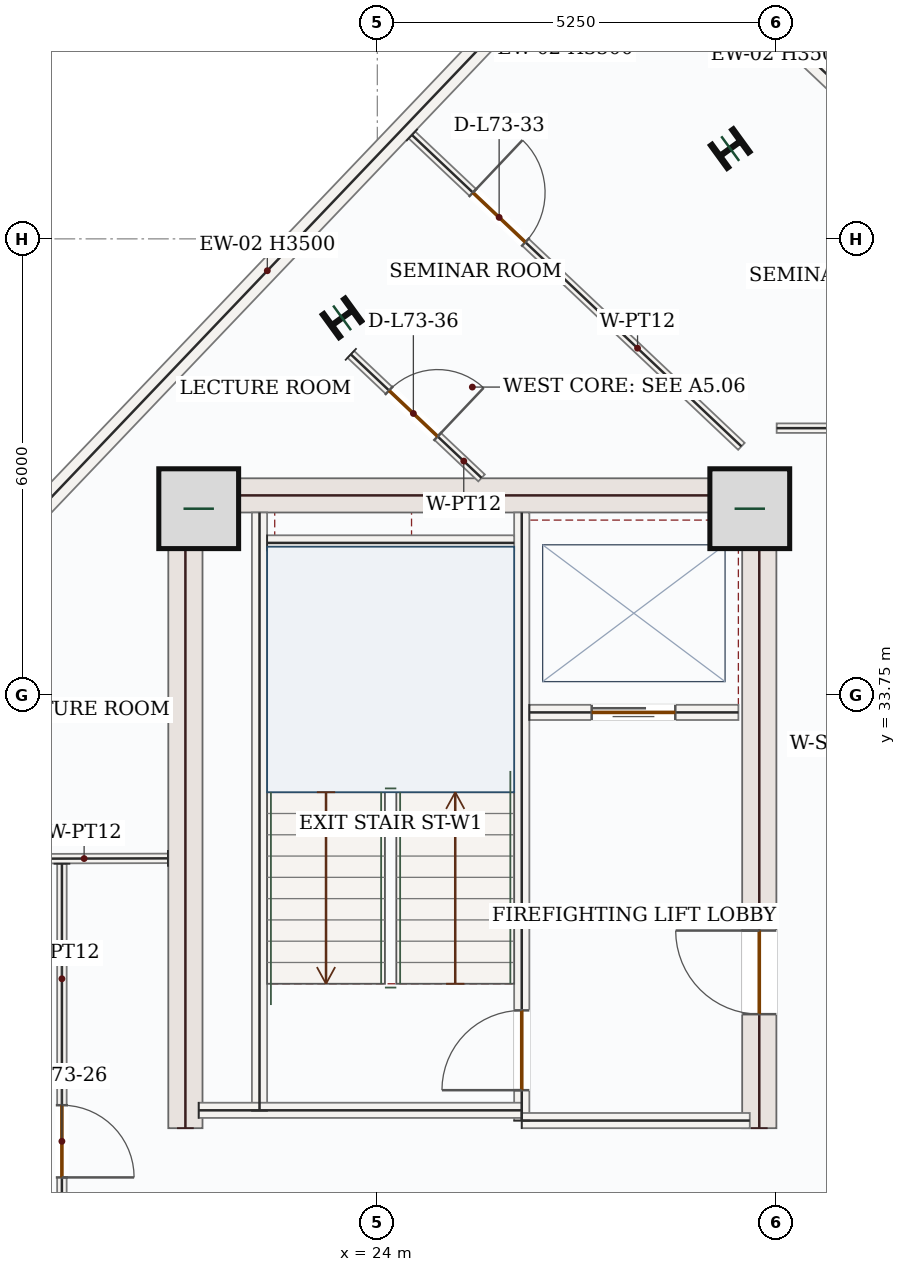
"""IFC4 building model, lengths in metres.
Left out: names, types, materials, properties, quantities, classifications, styles, units other than length and angle.
Written with IfcOpenShell. Run it as: python <this file> out.ifc"""

import sys

from ifc_helpers import new_model, si_unit, direction, frame, frame_2d, origin, origin_2d, place, context, subcontext, project, spatial, rectangle, i_section, extrude, source, transform, mapped, element, fill, save


model = new_model("IFC4")
c1 = context("Model", 3, precision=1e-05, world=origin(), true_north=direction((0.0, 1.0)))
c2 = subcontext(c1, "Body", "Model", "MODEL_VIEW")
j1 = project(units=[si_unit("LENGTHUNIT", "METRE"), si_unit("PLANEANGLEUNIT", "RADIAN")], contexts=[c1])
p1 = place(None, origin())
s1 = spatial("IfcSite", under=j1, at=p1, CompositionType="ELEMENT")
p2 = place(p1, origin())
s2 = spatial("IfcBuilding", under=s1, at=p2, CompositionType="ELEMENT")
p3 = place(p2, frame((0.0, 0.0, 302.85)))
s3 = spatial("IfcBuildingStorey", under=s2, at=p3, CompositionType="ELEMENT", Elevation=302.85)
m1 = source(origin(), c2, "Body", "SweptSolid", [
    extrude(rectangle(XDim=8.55, YDim=0.45, at=frame_2d((4.275, 0.0))), origin(), (0.0, 0.0, 1.0), 3.5),
])
p4 = place(p3, frame((21.475, 28.05, 0.0), z_axis=(0.0, 0.0, 1.0), x_axis=(0.0, 1.0, 0.0)))
e1 = element("IfcWall", 1, at=p4, inside=s3, PredefinedType="SHEAR", context=c2, shape_type="MappedRepresentation", body=[
    mapped(m1, transform((0.0, 0.0, 0.0), x_axis=(1.0, 0.0, 0.0), y_axis=(0.0, 1.0, 0.0), z_axis=(0.0, 0.0, 1.0), scale=1.0)),
])
p5 = place(p3, frame((29.025, 28.05, 0.0), z_axis=(0.0, 0.0, 1.0), x_axis=(0.0, 1.0, 0.0)))
e2 = element("IfcWall", 2, at=p5, inside=s3, PredefinedType="SHEAR", context=c2, shape_type="SweptSolid", body=[
    extrude(rectangle(XDim=8.55, YDim=0.45, at=frame_2d((4.275, 0.0))), origin(), (0.0, 0.0, 1.0), 3.5),
])
p6 = place(p5, frame((1.5, 0.0, 0.0)))
e3 = element("IfcOpeningElement", 3, at=p6, cuts=e2, PredefinedType="OPENING", context=c2, shape_type="SweptSolid", body=[
    extrude(rectangle(XDim=1.1, YDim=2.2, at=frame_2d((0.55, 1.1))), frame((0.0, 0.235, 0.0), z_axis=(0.0, -1.0, 0.0), x_axis=(1.0, 0.0, 0.0)), (0.0, 0.0, 1.0), 0.47),
])
m2 = source(origin(), c2, "Body", "SweptSolid", [
    extrude(rectangle(XDim=7.1, YDim=0.45, at=frame_2d((3.55, 0.0))), origin(), (0.0, 0.0, 1.0), 3.5),
])
p7 = place(p3, frame((21.7, 36.375, 0.0), z_axis=(0.0, 0.0, 1.0), x_axis=(1.0, 0.0, 0.0)))
e4 = element("IfcWall", 4, at=p7, inside=s3, PredefinedType="SHEAR", context=c2, shape_type="MappedRepresentation", body=[
    mapped(m2, transform((0.0, 0.0, 0.0), x_axis=(1.0, 0.0, 0.0), y_axis=(0.0, 1.0, 0.0), z_axis=(0.0, 0.0, 1.0), scale=1.0)),
])
m3 = source(origin(), c2, "Body", "SweptSolid", [
    extrude(rectangle(XDim=1.05, YDim=1.05, at=origin_2d()), origin(), (0.0, 0.0, 1.0), 3.75),
])
for number, where, z_axis, x_axis in (
    (5, (21.65, 36.2, 0.0), (0.0, 0.0, 1.0), (1.0, 0.0, 0.0)),
    (6, (28.9, 36.2, 0.0), (0.0, 0.0, 1.0), (1.0, 0.0, 0.0)),
):
    element("IfcColumn", number, at=place(p3, frame(where, z_axis=z_axis, x_axis=x_axis)), inside=s3, PredefinedType="COLUMN", context=c2, shape_type="MappedRepresentation", body=[
        mapped(m3, transform((0.0, 0.0, 0.0), x_axis=(1.0, 0.0, 0.0), y_axis=(0.0, 1.0, 0.0), z_axis=(0.0, 0.0, 1.0), scale=1.0)),
    ])
m4 = source(origin(), c2, "Body", "SweptSolid", [
    extrude(i_section(OverallWidth=0.374, OverallDepth=0.372, WebThickness=0.016, FlangeThickness=0.026, FilletRadius=0.018, at=origin_2d()), origin(), (0.0, 0.0, 1.0), 3.75),
])
for number, where, z_axis, x_axis in (
    (7, (28.643, 40.937, 0.0), (0.0, 0.0, 1.0), (-0.588, 0.809, 0.0)),
    (8, (23.536, 38.711, 0.0), (0.0, 0.0, 1.0), (-0.588, 0.809, 0.0)),
):
    element("IfcColumn", number, at=place(p3, frame(where, z_axis=z_axis, x_axis=x_axis)), inside=s3, PredefinedType="COLUMN", context=c2, shape_type="MappedRepresentation", body=[
        mapped(m4, transform((0.0, 0.0, 0.0), x_axis=(1.0, 0.0, 0.0), y_axis=(0.0, 1.0, 0.0), z_axis=(0.0, 0.0, 1.0), scale=1.0)),
    ])
m5 = source(origin(), c2, "Body", "SweptSolid", [
    extrude(rectangle(XDim=10.47, YDim=0.28, at=frame_2d((5.235, 0.0))), origin(), (0.0, 0.0, 1.0), 3.5),
])
p8 = place(p3, frame((18.94, 35.542, 0.0), z_axis=(0.0, 0.0, 1.0), x_axis=(0.690070788875, 0.723741878256, 0.0)))
e9 = element("IfcWall", 9, at=p8, inside=s3, PredefinedType="SOLIDWALL", context=c2, shape_type="MappedRepresentation", body=[
    mapped(m5, transform((0.0, 0.0, 0.0), x_axis=(1.0, 0.0, 0.0), y_axis=(0.0, 1.0, 0.0), z_axis=(0.0, 0.0, 1.0), scale=1.0)),
])
p9 = place(p3, frame((28.568, 43.188, 0.0), z_axis=(0.0, 0.0, 1.0), x_axis=(0.726765623086, -0.686885528382, 0.0)))
e10 = element("IfcWall", 10, at=p9, inside=s3, PredefinedType="SOLIDWALL", context=c2, shape_type="SweptSolid", body=[
    extrude(rectangle(XDim=5.718, YDim=0.28, at=frame_2d((2.859, 0.0))), origin(), (0.0, 0.0, 1.0), 3.5),
])
p10 = place(p9, frame((2.109, 0.0, 0.85)))
e11 = element("IfcOpeningElement", 11, at=p10, cuts=e10, PredefinedType="OPENING", context=c2, shape_type="SweptSolid", body=[
    extrude(rectangle(XDim=1.5, YDim=1.5, at=frame_2d((0.75, 0.75))), frame((0.0, 0.15, 0.0), z_axis=(0.0, -1.0, 0.0), x_axis=(1.0, 0.0, 0.0)), (0.0, 0.0, 1.0), 0.3),
])
m6 = source(origin(), c2, "Body", "SweptSolid", [
    extrude(rectangle(XDim=7.87, YDim=0.2, at=frame_2d((3.935, 0.0))), origin(), (0.0, 0.0, 1.0), 3.5),
])
p11 = place(p3, frame((22.45, 28.28, 0.0), z_axis=(0.0, 0.0, 1.0), x_axis=(0.0, 1.0, 0.0)))
e12 = element("IfcWall", 12, at=p11, inside=s3, PredefinedType="SOLIDWALL", context=c2, shape_type="MappedRepresentation", body=[
    mapped(m6, transform((0.0, 0.0, 0.0), x_axis=(1.0, 0.0, 0.0), y_axis=(0.0, 1.0, 0.0), z_axis=(0.0, 0.0, 1.0), scale=1.0)),
])
p12 = place(p3, frame((25.9, 28.15, 0.0), z_axis=(0.0, 0.0, 1.0), x_axis=(0.0, 1.0, 0.0)))
e13 = element("IfcWall", 13, at=p12, inside=s3, PredefinedType="SOLIDWALL", context=c2, shape_type="SweptSolid", body=[
    extrude(rectangle(XDim=8.0, YDim=0.2, at=frame_2d((4.0, 0.0))), origin(), (0.0, 0.0, 1.0), 3.5),
])
p13 = place(p12, frame((0.4, 0.0, 0.0)))
e14 = element("IfcOpeningElement", 14, at=p13, cuts=e13, PredefinedType="OPENING", context=c2, shape_type="SweptSolid", body=[
    extrude(rectangle(XDim=1.05, YDim=2.15, at=frame_2d((0.525, 1.075))), frame((0.0, 0.11, 0.0), z_axis=(0.0, -1.0, 0.0), x_axis=(1.0, 0.0, 0.0)), (0.0, 0.0, 1.0), 0.22),
])
m7 = source(origin(), c2, "Body", "SweptSolid", [
    extrude(rectangle(XDim=4.25, YDim=0.2, at=frame_2d((2.125, 0.0))), origin(), (0.0, 0.0, 1.0), 3.5),
])
p14 = place(p3, frame((21.65, 28.285, 0.0), z_axis=(0.0, 0.0, 1.0), x_axis=(1.0, 0.0, 0.0)))
e15 = element("IfcWall", 15, at=p14, inside=s3, PredefinedType="SOLIDWALL", context=c2, shape_type="MappedRepresentation", body=[
    mapped(m7, transform((0.0, 0.0, 0.0), x_axis=(1.0, 0.0, 0.0), y_axis=(0.0, 1.0, 0.0), z_axis=(0.0, 0.0, 1.0), scale=1.0)),
])
m8 = source(origin(), c2, "Body", "SweptSolid", [
    extrude(rectangle(XDim=3.0, YDim=0.2, at=frame_2d((1.5, 0.0))), origin(), (0.0, 0.0, 1.0), 3.5),
])
p15 = place(p3, frame((25.9, 28.15, 0.0), z_axis=(0.0, 0.0, 1.0), x_axis=(1.0, 0.0, 0.0)))
e16 = element("IfcWall", 16, at=p15, inside=s3, PredefinedType="SOLIDWALL", context=c2, shape_type="MappedRepresentation", body=[
    mapped(m8, transform((0.0, 0.0, 0.0), x_axis=(1.0, 0.0, 0.0), y_axis=(0.0, 1.0, 0.0), z_axis=(0.0, 0.0, 1.0), scale=1.0)),
])
m9 = source(origin(), c2, "Body", "SweptSolid", [
    extrude(rectangle(XDim=3.25, YDim=0.2, at=frame_2d((1.625, 0.0))), origin(), (0.0, 0.0, 1.0), 3.5),
])
p16 = place(p3, frame((22.55, 35.75, 0.0), z_axis=(0.0, 0.0, 1.0), x_axis=(1.0, 0.0, 0.0)))
e17 = element("IfcWall", 17, at=p16, inside=s3, PredefinedType="SOLIDWALL", context=c2, shape_type="MappedRepresentation", body=[
    mapped(m9, transform((0.0, 0.0, 0.0), x_axis=(1.0, 0.0, 0.0), y_axis=(0.0, 1.0, 0.0), z_axis=(0.0, 0.0, 1.0), scale=1.0)),
])
p17 = place(p3, frame((26.0, 33.52, 0.0), z_axis=(0.0, 0.0, 1.0), x_axis=(1.0, 0.0, 0.0)))
e18 = element("IfcWall", 18, at=p17, inside=s3, PredefinedType="SOLIDWALL", context=c2, shape_type="SweptSolid", body=[
    extrude(rectangle(XDim=2.75, YDim=0.2, at=frame_2d((1.375, 0.0))), origin(), (0.0, 0.0, 1.0), 3.5),
])
p18 = place(p17, frame((0.82, 0.0, 0.0)))
e19 = element("IfcOpeningElement", 19, at=p18, cuts=e18, PredefinedType="OPENING", context=c2, shape_type="SweptSolid", body=[
    extrude(rectangle(XDim=1.1, YDim=2.15, at=frame_2d((0.55, 1.075))), frame((0.0, 0.11, 0.0), z_axis=(0.0, -1.0, 0.0), x_axis=(1.0, 0.0, 0.0)), (0.0, 0.0, 1.0), 0.22),
])
p19 = place(p3, frame((23.651, 38.231, 0.0), z_axis=(0.0, 0.0, 1.0), x_axis=(0.726735597886, -0.686917295433, 0.0)))
e20 = element("IfcWall", 20, at=p19, inside=s3, PredefinedType="PARTITIONING", context=c2, shape_type="SweptSolid", body=[
    extrude(rectangle(XDim=2.367, YDim=0.125, at=frame_2d((1.183, 0.0))), origin(), (0.0, 0.0, 1.0), 3.5),
])
p20 = place(p19, frame((0.692, 0.0, 0.0)))
e21 = element("IfcOpeningElement", 21, at=p20, cuts=e20, PredefinedType="OPENING", context=c2, shape_type="SweptSolid", body=[
    extrude(rectangle(XDim=0.88, YDim=2.1, at=frame_2d((0.44, 1.05))), frame((0.0, 0.073, 0.0), z_axis=(0.0, -1.0, 0.0), x_axis=(1.0, 0.0, 0.0)), (0.0, 0.0, 1.0), 0.145),
])
p21 = place(p3, frame((24.456, 41.117, 0.0), z_axis=(0.0, 0.0, 1.0), x_axis=(0.726761082497, -0.686890332562, 0.0)))
e22 = element("IfcWall", 22, at=p21, inside=s3, PredefinedType="PARTITIONING", context=c2, shape_type="SweptSolid", body=[
    extrude(rectangle(XDim=5.964, YDim=0.125, at=frame_2d((2.982, 0.0))), origin(), (0.0, 0.0, 1.0), 3.5),
])
p22 = place(p21, frame((1.103, 0.0, 0.0)))
e23 = element("IfcOpeningElement", 23, at=p22, cuts=e22, PredefinedType="OPENING", context=c2, shape_type="SweptSolid", body=[
    extrude(rectangle(XDim=0.95, YDim=2.15, at=frame_2d((0.475, 1.075))), frame((0.0, 0.073, 0.0), z_axis=(0.0, -1.0, 0.0), x_axis=(1.0, 0.0, 0.0)), (0.0, 0.0, 1.0), 0.145),
])
m10 = source(origin(), c2, "Body", "SweptSolid", [
    extrude(rectangle(XDim=2.205, YDim=0.125, at=frame_2d((1.103, 0.0))), origin(), (0.0, 0.0, 1.0), 3.5),
])
p23 = place(p3, frame((21.245, 31.6, 0.0), z_axis=(0.0, 0.0, 1.0), x_axis=(-0.999997033492, -0.002435776654, 0.0)))
e24 = element("IfcWall", 24, at=p23, inside=s3, PredefinedType="PARTITIONING", context=c2, shape_type="MappedRepresentation", body=[
    mapped(m10, transform((0.0, 0.0, 0.0), x_axis=(1.0, 0.0, 0.0), y_axis=(0.0, 1.0, 0.0), z_axis=(0.0, 0.0, 1.0), scale=1.0)),
])
p24 = place(p3, frame((19.851, 31.529, 0.0), z_axis=(0.0, 0.0, 1.0), x_axis=(-9.7219521e-05, -0.999999995274, 0.0)))
e25 = element("IfcWall", 25, at=p24, inside=s3, PredefinedType="PARTITIONING", context=c2, shape_type="SweptSolid", body=[
    extrude(rectangle(XDim=5.022, YDim=0.125, at=frame_2d((2.511, 0.0))), origin(), (0.0, 0.0, 1.0), 3.5),
])
p25 = place(p24, frame((3.177, 0.0, 0.0)))
e26 = element("IfcOpeningElement", 26, at=p25, cuts=e25, PredefinedType="OPENING", context=c2, shape_type="SweptSolid", body=[
    extrude(rectangle(XDim=0.95, YDim=2.15, at=frame_2d((0.475, 1.075))), frame((0.0, 0.073, 0.0), z_axis=(0.0, -1.0, 0.0), x_axis=(1.0, 0.0, 0.0)), (0.0, 0.0, 1.0), 0.145),
])
p26 = place(p3, frame((35.653, 37.26, 0.0), z_axis=(0.0, 0.0, 1.0), x_axis=(-0.999999997089, -7.6303842e-05, 0.0)))
e27 = element("IfcWall", 27, at=p26, inside=s3, PredefinedType="PARTITIONING", context=c2, shape_type="SweptSolid", body=[
    extrude(rectangle(XDim=6.399, YDim=0.125, at=frame_2d((3.2, 0.0))), origin(), (0.0, 0.0, 1.0), 3.5),
])
p27 = place(p26, frame((1.199, 0.0, 0.0)))
e28 = element("IfcOpeningElement", 28, at=p27, cuts=e27, PredefinedType="OPENING", context=c2, shape_type="SweptSolid", body=[
    extrude(rectangle(XDim=0.95, YDim=2.15, at=frame_2d((0.475, 1.075))), frame((0.0, 0.073, 0.0), z_axis=(0.0, -1.0, 0.0), x_axis=(1.0, 0.0, 0.0)), (0.0, 0.0, 1.0), 0.145),
])
m11 = source(origin(), c2, "Body", "SweptSolid", [
    extrude(rectangle(XDim=1.05, YDim=2.15, at=frame_2d((0.525, 1.075))), frame((0.0, 0.025, 0.0), z_axis=(0.0, -1.0, 0.0), x_axis=(1.0, 0.0, 0.0)), (0.0, 0.0, 1.0), 0.05),
])
p28 = place(p13, origin())
e29 = element("IfcDoor", 29, at=p28, inside=s3, OperationType="SINGLE_SWING_LEFT", PredefinedType="DOOR", context=c2, shape_type="MappedRepresentation", body=[
    mapped(m11, transform((0.0, 0.0, 0.0), x_axis=(1.0, 0.0, 0.0), y_axis=(0.0, 1.0, 0.0), z_axis=(0.0, 0.0, 1.0), scale=1.0)),
])
fill(e14, e29)
m12 = source(origin(), c2, "Body", "SweptSolid", [
    extrude(rectangle(XDim=1.1, YDim=2.15, at=frame_2d((0.55, 1.075))), frame((0.0, 0.025, 0.0), z_axis=(0.0, -1.0, 0.0), x_axis=(1.0, 0.0, 0.0)), (0.0, 0.0, 1.0), 0.05),
])
p29 = place(p18, origin())
e30 = element("IfcDoor", 30, at=p29, inside=s3, OperationType="DOUBLE_DOOR_SLIDING", PredefinedType="DOOR", context=c2, shape_type="MappedRepresentation", body=[
    mapped(m12, transform((0.0, 0.0, 0.0), x_axis=(1.0, 0.0, 0.0), y_axis=(0.0, 1.0, 0.0), z_axis=(0.0, 0.0, 1.0), scale=1.0)),
])
fill(e19, e30)
m13 = source(origin(), c2, "Body", "SweptSolid", [
    extrude(rectangle(XDim=1.1, YDim=2.2, at=frame_2d((0.55, 1.1))), frame((0.0, 0.025, 0.0), z_axis=(0.0, -1.0, 0.0), x_axis=(1.0, 0.0, 0.0)), (0.0, 0.0, 1.0), 0.05),
])
p30 = place(p6, origin())
e31 = element("IfcDoor", 31, at=p30, inside=s3, OperationType="SINGLE_SWING_RIGHT", PredefinedType="DOOR", context=c2, shape_type="MappedRepresentation", body=[
    mapped(m13, transform((0.0, 0.0, 0.0), x_axis=(1.0, 0.0, 0.0), y_axis=(0.0, 1.0, 0.0), z_axis=(0.0, 0.0, 1.0), scale=1.0)),
])
fill(e3, e31)
m14 = source(origin(), c2, "Body", "SweptSolid", [
    extrude(rectangle(XDim=0.95, YDim=2.15, at=frame_2d((0.475, 1.075))), frame((0.0, 0.025, 0.0), z_axis=(0.0, -1.0, 0.0), x_axis=(1.0, 0.0, 0.0)), (0.0, 0.0, 1.0), 0.05),
])
p31 = place(p25, origin())
e32 = element("IfcDoor", 32, at=p31, inside=s3, OperationType="SINGLE_SWING_RIGHT", PredefinedType="DOOR", context=c2, shape_type="MappedRepresentation", body=[
    mapped(m14, transform((0.0, 0.0, 0.0), x_axis=(1.0, 0.0, 0.0), y_axis=(0.0, 1.0, 0.0), z_axis=(0.0, 0.0, 1.0), scale=1.0)),
])
fill(e26, e32)
p32 = place(p22, origin())
e33 = element("IfcDoor", 33, at=p32, inside=s3, OperationType="SINGLE_SWING_LEFT", PredefinedType="DOOR", context=c2, shape_type="MappedRepresentation", body=[
    mapped(m14, transform((0.0, 0.0, 0.0), x_axis=(1.0, 0.0, 0.0), y_axis=(0.0, 1.0, 0.0), z_axis=(0.0, 0.0, 1.0), scale=1.0)),
])
fill(e23, e33)
m15 = source(origin(), c2, "Body", "SweptSolid", [
    extrude(rectangle(XDim=0.88, YDim=2.1, at=frame_2d((0.44, 1.05))), frame((0.0, 0.025, 0.0), z_axis=(0.0, -1.0, 0.0), x_axis=(1.0, 0.0, 0.0)), (0.0, 0.0, 1.0), 0.05),
])
p33 = place(p20, origin())
e34 = element("IfcDoor", 34, at=p33, inside=s3, OperationType="SINGLE_SWING_RIGHT", PredefinedType="DOOR", context=c2, shape_type="MappedRepresentation", body=[
    mapped(m15, transform((0.0, 0.0, 0.0), x_axis=(1.0, 0.0, 0.0), y_axis=(0.0, 1.0, 0.0), z_axis=(0.0, 0.0, 1.0), scale=1.0)),
])
fill(e21, e34)
save(model, sys.argv[1])
